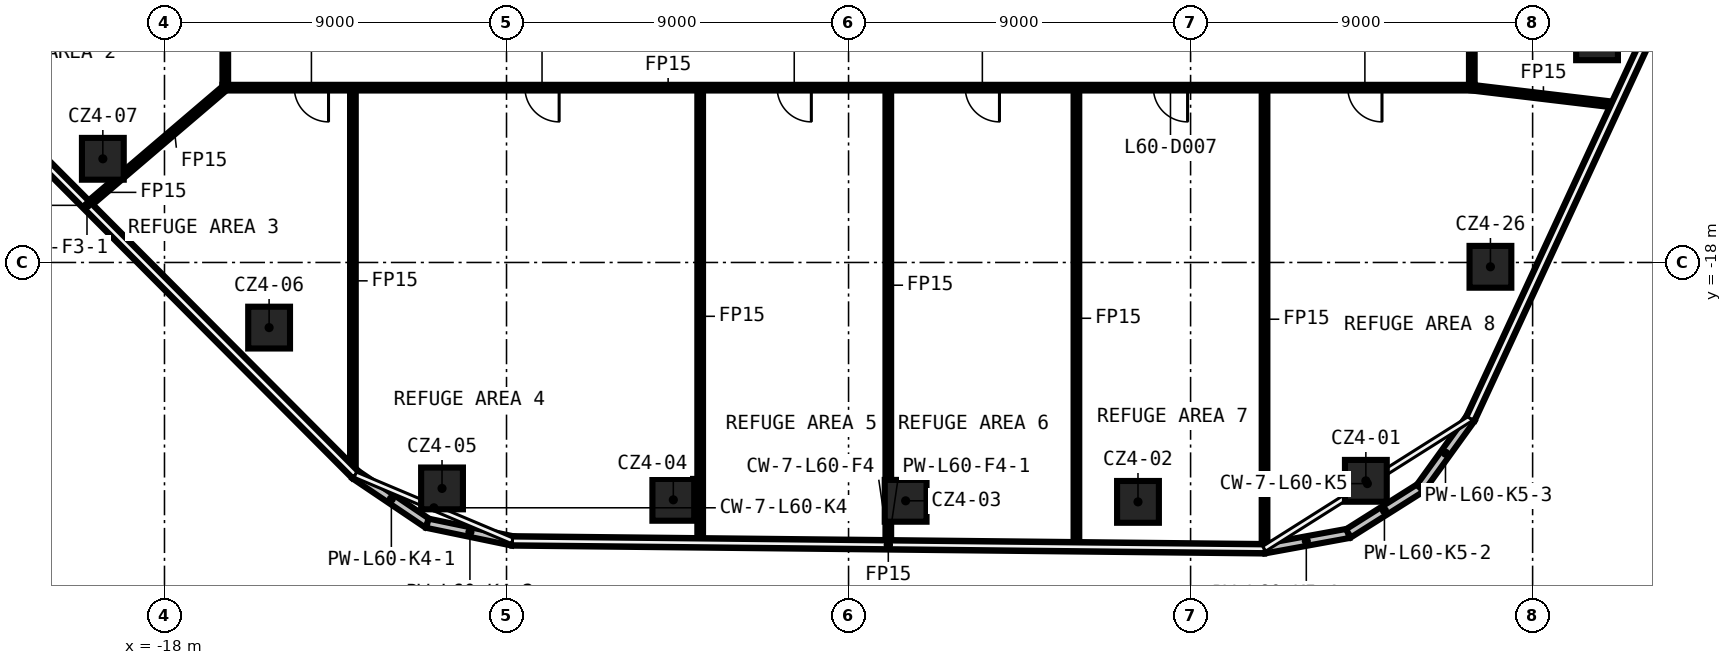
"""IFC4 building model, lengths in metres.
Left out: names, types, materials, properties, quantities, classifications, styles, units other than length and angle.
Written with IfcOpenShell. Run it as: python <this file> out.ifc"""

import sys

from ifc_helpers import new_model, si_unit, direction, frame, frame_2d, origin, origin_2d, place, context, subcontext, project, spatial, rectangle, extrude, element, fill, save


model = new_model("IFC4")
c1 = context("Model", 3, precision=1e-05, world=origin(), true_north=direction((0.0, 1.0)))
c2 = subcontext(c1, "Body", "Model", "MODEL_VIEW")
j1 = project(units=[si_unit("LENGTHUNIT", "METRE"), si_unit("PLANEANGLEUNIT", "RADIAN")], contexts=[c1])
p1 = place(None, origin())
s1 = spatial("IfcSite", under=j1, at=p1, CompositionType="ELEMENT")
p2 = place(p1, origin())
s2 = spatial("IfcBuilding", under=s1, at=p2, CompositionType="ELEMENT")
p3 = place(p2, frame((0.0, 0.0, 283.2)))
s3 = spatial("IfcBuildingStorey", under=s2, at=p3, CompositionType="ELEMENT", Elevation=283.2)
for number, where, z_axis, x_axis in (
    (1, (13.612, -23.746, 0.0), (0.0, 0.0, 1.0), (1.0, 0.0, 0.0)),
    (2, (7.616, -24.3, 0.0), (0.0, 0.0, 1.0), (1.0, 0.0, 0.0)),
    (3, (1.502, -24.272, 0.0), (0.0, 0.0, 1.0), (1.0, 0.0, 0.0)),
    (4, (-4.611, -24.246, 0.0), (0.0, 0.0, 1.0), (1.0, 0.0, 0.0)),
    (5, (-10.697, -23.946, 0.0), (0.0, 0.0, 1.0), (1.0, 0.0, 0.0)),
    (6, (-15.247, -19.714, 0.0), (0.0, 0.0, 1.0), (1.0, 0.0, 0.0)),
    (7, (-19.622, -15.272, 0.0), (0.0, 0.0, 1.0), (1.0, 0.0, 0.0)),
    (8, (19.695, -12.127, 0.0), (0.0, 0.0, 1.0), (1.0, 0.0, 0.0)),
    (9, (16.89, -18.114, 0.0), (0.0, 0.0, 1.0), (1.0, 0.0, 0.0)),
):
    element("IfcColumn", number, at=place(p3, frame(where, z_axis=z_axis, x_axis=x_axis)), inside=s3, PredefinedType="COLUMN", context=c2, shape_type="SweptSolid", body=[
        extrude(rectangle(XDim=1.1, YDim=1.1, at=origin_2d()), origin(), (0.0, 0.0, 1.0), 5.55),
    ])
p4 = place(p3, frame((16.475, -13.4, 0.0), z_axis=(0.0, 0.0, 1.0), x_axis=(-1.0, 0.0, 0.0)))
e10 = element("IfcWall", 10, at=p4, inside=s3, PredefinedType="PARTITIONING", context=c2, shape_type="SweptSolid", body=[
    extrude(rectangle(XDim=32.95, YDim=0.15, at=frame_2d((16.475, 0.0))), origin(), (0.0, 0.0, 1.0), 5.55),
])
p5 = place(p4, frame((30.159, 0.0, 0.0)))
e11 = element("IfcOpeningElement", 11, at=p5, cuts=e10, PredefinedType="OPENING", context=c2, shape_type="SweptSolid", body=[
    extrude(rectangle(XDim=0.9, YDim=2.1, at=frame_2d((0.45, 1.05))), frame((0.0, 0.085, 0.0), z_axis=(0.0, -1.0, 0.0), x_axis=(1.0, 0.0, 0.0)), (0.0, 0.0, 1.0), 0.17),
])
p6 = place(p4, frame((24.091, 0.0, 0.0)))
e12 = element("IfcOpeningElement", 12, at=p6, cuts=e10, PredefinedType="OPENING", context=c2, shape_type="SweptSolid", body=[
    extrude(rectangle(XDim=0.9, YDim=2.1, at=frame_2d((0.45, 1.05))), frame((0.0, 0.085, 0.0), z_axis=(0.0, -1.0, 0.0), x_axis=(1.0, 0.0, 0.0)), (0.0, 0.0, 1.0), 0.17),
])
p7 = place(p4, frame((17.454, 0.0, 0.0)))
e13 = element("IfcOpeningElement", 13, at=p7, cuts=e10, PredefinedType="OPENING", context=c2, shape_type="SweptSolid", body=[
    extrude(rectangle(XDim=0.9, YDim=2.1, at=frame_2d((0.45, 1.05))), frame((0.0, 0.085, 0.0), z_axis=(0.0, -1.0, 0.0), x_axis=(1.0, 0.0, 0.0)), (0.0, 0.0, 1.0), 0.17),
])
p8 = place(p4, frame((12.504, 0.0, 0.0)))
e14 = element("IfcOpeningElement", 14, at=p8, cuts=e10, PredefinedType="OPENING", context=c2, shape_type="SweptSolid", body=[
    extrude(rectangle(XDim=0.9, YDim=2.1, at=frame_2d((0.45, 1.05))), frame((0.0, 0.085, 0.0), z_axis=(0.0, -1.0, 0.0), x_axis=(1.0, 0.0, 0.0)), (0.0, 0.0, 1.0), 0.17),
])
p9 = place(p4, frame((7.554, 0.0, 0.0)))
e15 = element("IfcOpeningElement", 15, at=p9, cuts=e10, PredefinedType="OPENING", context=c2, shape_type="SweptSolid", body=[
    extrude(rectangle(XDim=0.9, YDim=2.1, at=frame_2d((0.45, 1.05))), frame((0.0, 0.085, 0.0), z_axis=(0.0, -1.0, 0.0), x_axis=(1.0, 0.0, 0.0)), (0.0, 0.0, 1.0), 0.17),
])
p10 = place(p4, frame((2.438, 0.0, 0.0)))
e16 = element("IfcOpeningElement", 16, at=p10, cuts=e10, PredefinedType="OPENING", context=c2, shape_type="SweptSolid", body=[
    extrude(rectangle(XDim=0.9, YDim=2.1, at=frame_2d((0.45, 1.05))), frame((0.0, 0.085, 0.0), z_axis=(0.0, -1.0, 0.0), x_axis=(1.0, 0.0, 0.0)), (0.0, 0.0, 1.0), 0.17),
])
p11 = place(p3, frame((-20.019, -16.489, 0.0), z_axis=(0.0, 0.0, 1.0), x_axis=(0.760647520032, 0.649165117877, 0.0)))
e17 = element("IfcWall", 17, at=p11, inside=s3, PredefinedType="PARTITIONING", context=c2, shape_type="SweptSolid", body=[
    extrude(rectangle(XDim=1.027, YDim=0.15, at=frame_2d((0.514, 0.0))), origin(), (0.0, 0.0, 1.0), 5.55),
])
p12 = place(p3, frame((-19.072, -15.681, 0.0), z_axis=(0.0, 0.0, 1.0), x_axis=(0.760643176825, 0.649170206918, 0.0)))
e18 = element("IfcWall", 18, at=p12, inside=s3, PredefinedType="PARTITIONING", context=c2, shape_type="SweptSolid", body=[
    extrude(rectangle(XDim=3.513, YDim=0.15, at=frame_2d((1.756, 0.0))), origin(), (0.0, 0.0, 1.0), 5.55),
])
p13 = place(p3, frame((16.4, 13.325, 0.0), z_axis=(0.0, 0.0, 1.0), x_axis=(0.0, -1.0, 0.0)))
e19 = element("IfcWall", 19, at=p13, inside=s3, PredefinedType="PARTITIONING", context=c2, shape_type="SweptSolid", body=[
    extrude(rectangle(XDim=26.65, YDim=0.15, at=frame_2d((13.325, 0.0))), origin(), (0.0, 0.0, 1.0), 5.55),
])
p14 = place(p13, frame((20.273, 0.0, 0.0)))
e20 = element("IfcOpeningElement", 20, at=p14, cuts=e19, PredefinedType="OPENING", context=c2, shape_type="SweptSolid", body=[
    extrude(rectangle(XDim=0.9, YDim=2.1, at=frame_2d((0.45, 1.05))), frame((0.0, 0.085, 0.0), z_axis=(0.0, -1.0, 0.0), x_axis=(1.0, 0.0, 0.0)), (0.0, 0.0, 1.0), 0.17),
])
p15 = place(p13, frame((16.375, 0.0, 0.0)))
e21 = element("IfcOpeningElement", 21, at=p15, cuts=e19, PredefinedType="OPENING", context=c2, shape_type="SweptSolid", body=[
    extrude(rectangle(XDim=0.9, YDim=2.1, at=frame_2d((0.45, 1.05))), frame((0.0, 0.085, 0.0), z_axis=(0.0, -1.0, 0.0), x_axis=(1.0, 0.0, 0.0)), (0.0, 0.0, 1.0), 0.17),
])
p16 = place(p13, frame((10.108, 0.0, 0.0)))
e22 = element("IfcOpeningElement", 22, at=p16, cuts=e19, PredefinedType="OPENING", context=c2, shape_type="SweptSolid", body=[
    extrude(rectangle(XDim=0.9, YDim=2.1, at=frame_2d((0.45, 1.05))), frame((0.0, 0.085, 0.0), z_axis=(0.0, -1.0, 0.0), x_axis=(1.0, 0.0, 0.0)), (0.0, 0.0, 1.0), 0.17),
])
p17 = place(p13, frame((2.579, 0.0, 0.0)))
e23 = element("IfcOpeningElement", 23, at=p17, cuts=e19, PredefinedType="OPENING", context=c2, shape_type="SweptSolid", body=[
    extrude(rectangle(XDim=0.9, YDim=2.1, at=frame_2d((0.45, 1.05))), frame((0.0, 0.085, 0.0), z_axis=(0.0, -1.0, 0.0), x_axis=(1.0, 0.0, 0.0)), (0.0, 0.0, 1.0), 0.17),
])
p18 = place(p3, frame((10.946, -25.512, 0.0), z_axis=(0.0, 0.0, 1.0), x_axis=(0.0, 1.0, 0.0)))
e24 = element("IfcWall", 24, at=p18, inside=s3, PredefinedType="PARTITIONING", context=c2, shape_type="SweptSolid", body=[
    extrude(rectangle(XDim=12.037, YDim=0.15, at=frame_2d((6.018, 0.0))), origin(), (0.0, 0.0, 1.0), 5.55),
])
p19 = place(p3, frame((5.996, -25.462, 0.0), z_axis=(0.0, 0.0, 1.0), x_axis=(0.0, 1.0, 0.0)))
e25 = element("IfcWall", 25, at=p19, inside=s3, PredefinedType="PARTITIONING", context=c2, shape_type="SweptSolid", body=[
    extrude(rectangle(XDim=11.987, YDim=0.15, at=frame_2d((5.994, 0.0))), origin(), (0.0, 0.0, 1.0), 5.55),
])
p20 = place(p3, frame((1.046, -25.41, 0.0), z_axis=(0.0, 0.0, 1.0), x_axis=(0.0, 1.0, 0.0)))
e26 = element("IfcWall", 26, at=p20, inside=s3, PredefinedType="PARTITIONING", context=c2, shape_type="SweptSolid", body=[
    extrude(rectangle(XDim=0.588, YDim=0.15, at=frame_2d((0.294, 0.0))), origin(), (0.0, 0.0, 1.0), 5.55),
])
p21 = place(p3, frame((1.046, -23.722, 0.0), z_axis=(0.0, 0.0, 1.0), x_axis=(0.0, 1.0, 0.0)))
e27 = element("IfcWall", 27, at=p21, inside=s3, PredefinedType="PARTITIONING", context=c2, shape_type="SweptSolid", body=[
    extrude(rectangle(XDim=10.247, YDim=0.15, at=frame_2d((5.124, 0.0))), origin(), (0.0, 0.0, 1.0), 5.55),
])
p22 = place(p3, frame((-3.904, -25.358, 0.0), z_axis=(0.0, 0.0, 1.0), x_axis=(0.0, 1.0, 0.0)))
e28 = element("IfcWall", 28, at=p22, inside=s3, PredefinedType="PARTITIONING", context=c2, shape_type="SweptSolid", body=[
    extrude(rectangle(XDim=11.883, YDim=0.15, at=frame_2d((5.942, 0.0))), origin(), (0.0, 0.0, 1.0), 5.55),
])
p23 = place(p3, frame((-13.042, -23.492, 0.0), z_axis=(0.0, 0.0, 1.0), x_axis=(0.0, 1.0, 0.0)))
e29 = element("IfcWall", 29, at=p23, inside=s3, PredefinedType="PARTITIONING", context=c2, shape_type="SweptSolid", body=[
    extrude(rectangle(XDim=10.017, YDim=0.15, at=frame_2d((5.008, 0.0))), origin(), (0.0, 0.0, 1.0), 5.55),
])
p24 = place(p3, frame((-16.4, -13.325, 0.0), z_axis=(0.0, 0.0, 1.0), x_axis=(0.0, 1.0, 0.0)))
e30 = element("IfcWall", 30, at=p24, inside=s3, PredefinedType="PARTITIONING", context=c2, shape_type="SweptSolid", body=[
    extrude(rectangle(XDim=26.65, YDim=0.15, at=frame_2d((13.325, 0.0))), origin(), (0.0, 0.0, 1.0), 5.55),
])
p25 = place(p24, frame((10.903, 0.0, 0.0)))
e31 = element("IfcOpeningElement", 31, at=p25, cuts=e30, PredefinedType="OPENING", context=c2, shape_type="SweptSolid", body=[
    extrude(rectangle(XDim=0.9, YDim=2.1, at=frame_2d((0.45, 1.05))), frame((0.0, 0.085, 0.0), z_axis=(0.0, -1.0, 0.0), x_axis=(1.0, 0.0, 0.0)), (0.0, 0.0, 1.0), 0.17),
])
p26 = place(p24, frame((3.885, 0.0, 0.0)))
e32 = element("IfcOpeningElement", 32, at=p26, cuts=e30, PredefinedType="OPENING", context=c2, shape_type="SweptSolid", body=[
    extrude(rectangle(XDim=0.9, YDim=2.1, at=frame_2d((0.45, 1.05))), frame((0.0, 0.085, 0.0), z_axis=(0.0, -1.0, 0.0), x_axis=(1.0, 0.0, 0.0)), (0.0, 0.0, 1.0), 0.17),
])
p27 = place(p24, frame((22.384, 0.0, 0.0)))
e33 = element("IfcOpeningElement", 33, at=p27, cuts=e30, PredefinedType="OPENING", context=c2, shape_type="SweptSolid", body=[
    extrude(rectangle(XDim=0.9, YDim=2.1, at=frame_2d((0.45, 1.05))), frame((0.0, 0.085, 0.0), z_axis=(0.0, -1.0, 0.0), x_axis=(1.0, 0.0, 0.0)), (0.0, 0.0, 1.0), 0.17),
])
p28 = place(p24, frame((15.37, 0.0, 0.0)))
e34 = element("IfcOpeningElement", 34, at=p28, cuts=e30, PredefinedType="OPENING", context=c2, shape_type="SweptSolid", body=[
    extrude(rectangle(XDim=0.9, YDim=2.1, at=frame_2d((0.45, 1.05))), frame((0.0, 0.085, 0.0), z_axis=(0.0, -1.0, 0.0), x_axis=(1.0, 0.0, 0.0)), (0.0, 0.0, 1.0), 0.17),
])
p29 = place(p3, frame((16.4, -13.4, 0.0), z_axis=(0.0, 0.0, 1.0), x_axis=(0.992945775756, -0.118569331652, 0.0)))
e35 = element("IfcWall", 35, at=p29, inside=s3, PredefinedType="PARTITIONING", context=c2, shape_type="SweptSolid", body=[
    extrude(rectangle(XDim=3.795, YDim=0.15, at=frame_2d((1.897, 0.0))), origin(), (0.0, 0.0, 1.0), 5.55),
])
p30 = place(p3, frame((-27.1, -9.409, 0.0), z_axis=(0.0, 0.0, 1.0), x_axis=(0.705769458317, -0.7084415796, 0.0)))
e36 = element("IfcWall", 36, at=p30, inside=s3, PredefinedType="SOLIDWALL", context=c2, shape_type="SweptSolid", body=[
    extrude(rectangle(XDim=20.009, YDim=0.25, at=frame_2d((10.004, 0.0))), origin(), (0.0, 0.0, 1.0), 5.55),
])
p31 = place(p3, frame((-12.978, -23.584, 0.0), z_axis=(0.0, 0.0, 1.0), x_axis=(0.829197575918, -0.558955615494, 0.0)))
e37 = element("IfcWall", 37, at=p31, inside=s3, PredefinedType="SOLIDWALL", context=c2, shape_type="SweptSolid", body=[
    extrude(rectangle(XDim=2.287, YDim=0.25, at=frame_2d((1.143, 0.0))), origin(), (0.0, 0.0, 1.0), 5.55),
])
p32 = place(p3, frame((-11.082, -24.862, 0.0), z_axis=(0.0, 0.0, 1.0), x_axis=(0.979138246768, -0.203195210861, 0.0)))
e38 = element("IfcWall", 38, at=p32, inside=s3, PredefinedType="SOLIDWALL", context=c2, shape_type="SweptSolid", body=[
    extrude(rectangle(XDim=2.286, YDim=0.25, at=frame_2d((1.143, 0.0))), origin(), (0.0, 0.0, 1.0), 5.55),
])
p33 = place(p3, frame((-8.844, -25.327, 0.0), z_axis=(0.0, 0.0, 1.0), x_axis=(0.999945361935, -0.010453379595, 0.0)))
e39 = element("IfcWall", 39, at=p33, inside=s3, PredefinedType="SOLIDWALL", context=c2, shape_type="SweptSolid", body=[
    extrude(rectangle(XDim=19.782, YDim=0.25, at=frame_2d((9.891, 0.0))), origin(), (0.0, 0.0, 1.0), 5.55),
])
p34 = place(p3, frame((10.937, -25.534, 0.0), z_axis=(0.0, 0.0, 1.0), x_axis=(0.983713424881, 0.179743978229, 0.0)))
e40 = element("IfcWall", 40, at=p34, inside=s3, PredefinedType="SOLIDWALL", context=c2, shape_type="SweptSolid", body=[
    extrude(rectangle(XDim=2.252, YDim=0.25, at=frame_2d((1.126, 0.0))), origin(), (0.0, 0.0, 1.0), 5.55),
])
p35 = place(p3, frame((13.153, -25.129, 0.0), z_axis=(0.0, 0.0, 1.0), x_axis=(0.845450092228, 0.534054436881, 0.0)))
e41 = element("IfcWall", 41, at=p35, inside=s3, PredefinedType="SOLIDWALL", context=c2, shape_type="SweptSolid", body=[
    extrude(rectangle(XDim=2.242, YDim=0.25, at=frame_2d((1.121, 0.0))), origin(), (0.0, 0.0, 1.0), 5.55),
])
p36 = place(p3, frame((15.048, -23.931, 0.0), z_axis=(0.0, 0.0, 1.0), x_axis=(0.585189696125, 0.810896429607, 0.0)))
e42 = element("IfcWall", 42, at=p36, inside=s3, PredefinedType="SOLIDWALL", context=c2, shape_type="SweptSolid", body=[
    extrude(rectangle(XDim=2.252, YDim=0.25, at=frame_2d((1.126, 0.0))), origin(), (0.0, 0.0, 1.0), 5.55),
])
p37 = place(p3, frame((16.366, -22.105, 0.0), z_axis=(0.0, 0.0, 1.0), x_axis=(0.420298344407, 0.907385971728, 0.0)))
e43 = element("IfcWall", 43, at=p37, inside=s3, PredefinedType="SOLIDWALL", context=c2, shape_type="SweptSolid", body=[
    extrude(rectangle(XDim=27.394, YDim=0.25, at=frame_2d((13.697, 0.0))), origin(), (0.0, 0.0, 1.0), 5.55),
])
p38 = place(p5, origin())
e44 = element("IfcDoor", 44, at=p38, inside=s3, OperationType="SINGLE_SWING_RIGHT", PredefinedType="DOOR", context=c2, shape_type="SweptSolid", body=[
    extrude(rectangle(XDim=0.9, YDim=2.1, at=frame_2d((0.45, 1.05))), frame((0.0, 0.025, 0.0), z_axis=(0.0, -1.0, 0.0), x_axis=(1.0, 0.0, 0.0)), (0.0, 0.0, 1.0), 0.05),
])
fill(e11, e44)
p39 = place(p6, origin())
e45 = element("IfcDoor", 45, at=p39, inside=s3, OperationType="SINGLE_SWING_LEFT", PredefinedType="DOOR", context=c2, shape_type="SweptSolid", body=[
    extrude(rectangle(XDim=0.9, YDim=2.1, at=frame_2d((0.45, 1.05))), frame((0.0, 0.025, 0.0), z_axis=(0.0, -1.0, 0.0), x_axis=(1.0, 0.0, 0.0)), (0.0, 0.0, 1.0), 0.05),
])
fill(e12, e45)
p40 = place(p7, origin())
e46 = element("IfcDoor", 46, at=p40, inside=s3, OperationType="SINGLE_SWING_RIGHT", PredefinedType="DOOR", context=c2, shape_type="SweptSolid", body=[
    extrude(rectangle(XDim=0.9, YDim=2.1, at=frame_2d((0.45, 1.05))), frame((0.0, 0.025, 0.0), z_axis=(0.0, -1.0, 0.0), x_axis=(1.0, 0.0, 0.0)), (0.0, 0.0, 1.0), 0.05),
])
fill(e13, e46)
p41 = place(p8, origin())
e47 = element("IfcDoor", 47, at=p41, inside=s3, OperationType="SINGLE_SWING_LEFT", PredefinedType="DOOR", context=c2, shape_type="SweptSolid", body=[
    extrude(rectangle(XDim=0.9, YDim=2.1, at=frame_2d((0.45, 1.05))), frame((0.0, 0.025, 0.0), z_axis=(0.0, -1.0, 0.0), x_axis=(1.0, 0.0, 0.0)), (0.0, 0.0, 1.0), 0.05),
])
fill(e14, e47)
p42 = place(p9, origin())
e48 = element("IfcDoor", 48, at=p42, inside=s3, OperationType="SINGLE_SWING_RIGHT", PredefinedType="DOOR", context=c2, shape_type="SweptSolid", body=[
    extrude(rectangle(XDim=0.9, YDim=2.1, at=frame_2d((0.45, 1.05))), frame((0.0, 0.025, 0.0), z_axis=(0.0, -1.0, 0.0), x_axis=(1.0, 0.0, 0.0)), (0.0, 0.0, 1.0), 0.05),
])
fill(e15, e48)
p43 = place(p10, origin())
e49 = element("IfcDoor", 49, at=p43, inside=s3, OperationType="SINGLE_SWING_LEFT", PredefinedType="DOOR", context=c2, shape_type="SweptSolid", body=[
    extrude(rectangle(XDim=0.9, YDim=2.1, at=frame_2d((0.45, 1.05))), frame((0.0, 0.025, 0.0), z_axis=(0.0, -1.0, 0.0), x_axis=(1.0, 0.0, 0.0)), (0.0, 0.0, 1.0), 0.05),
])
fill(e16, e49)
save(model, sys.argv[1])
